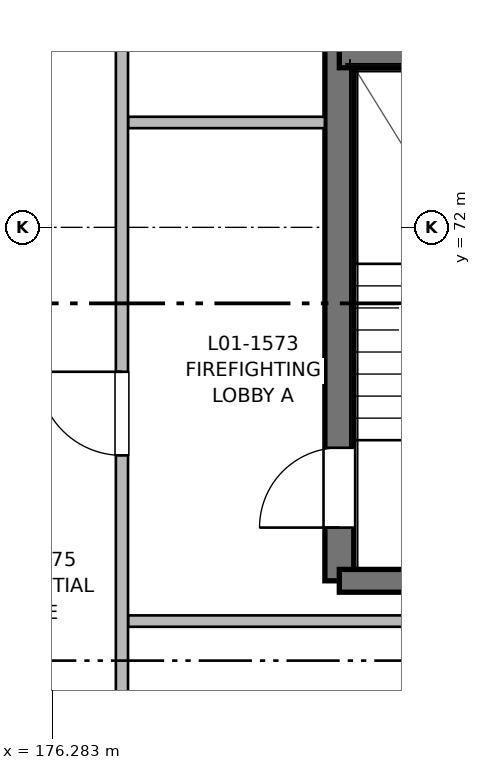
"""IFC4 building model, lengths in metres.
Left out: names, types, materials, properties, quantities, classifications, styles, units other than length and angle.
Written with IfcOpenShell. Run it as: python <this file> out.ifc"""

import sys

from ifc_helpers import new_model, si_unit, direction, frame, frame_2d, origin, place, context, subcontext, project, spatial, rectangle, extrude, element, fill, save


model = new_model("IFC4")
c1 = context("Model", 3, precision=1e-05, world=origin(), true_north=direction((0.0, 1.0)))
c2 = subcontext(c1, "Body", "Model", "MODEL_VIEW")
j1 = project(units=[si_unit("LENGTHUNIT", "METRE"), si_unit("PLANEANGLEUNIT", "RADIAN")], contexts=[c1])
p1 = place(None, origin())
s1 = spatial("IfcSite", under=j1, at=p1, CompositionType="ELEMENT")
p2 = place(p1, origin())
s2 = spatial("IfcBuilding", under=s1, at=p2, CompositionType="ELEMENT")
p3 = place(p2, frame((0.0, 0.0, 4.16)))
s3 = spatial("IfcBuildingStorey", under=s2, at=p3, CompositionType="ELEMENT", Elevation=4.16)
p4 = place(p3, frame((180.06, 67.35, 0.0), z_axis=(0.0, 0.0, 1.0), x_axis=(0.0, 1.0, 0.0)))
e1 = element("IfcWall", 1, at=p4, inside=s3, PredefinedType="SHEAR", context=c2, shape_type="SweptSolid", body=[
    extrude(rectangle(XDim=13.15, YDim=0.38, at=frame_2d((6.575, 0.0))), origin(), (0.0, 0.0, 1.0), 3.2),
])
p5 = place(p4, frame((0.7, 0.0, 0.0)))
e2 = element("IfcOpeningElement", 2, at=p5, cuts=e1, PredefinedType="OPENING", context=c2, shape_type="SweptSolid", body=[
    extrude(rectangle(XDim=1.05, YDim=2.15, at=frame_2d((0.525, 1.075))), frame((0.0, 0.2, 0.0), z_axis=(0.0, -1.0, 0.0), x_axis=(1.0, 0.0, 0.0)), (0.0, 0.0, 1.0), 0.4),
])
p6 = place(p3, frame((183.47, 67.35, 0.0), z_axis=(0.0, 0.0, 1.0), x_axis=(-1.0, 0.0, 0.0)))
e3 = element("IfcWall", 3, at=p6, inside=s3, PredefinedType="SHEAR", context=c2, shape_type="SweptSolid", body=[
    extrude(rectangle(XDim=3.41, YDim=0.3, at=frame_2d((1.705, 0.0))), origin(), (0.0, 0.0, 1.0), 3.2),
])
p7 = place(p3, frame((180.06, 74.24, 0.0), z_axis=(0.0, 0.0, 1.0), x_axis=(1.0, 0.0, 0.0)))
e4 = element("IfcWall", 4, at=p7, inside=s3, PredefinedType="SHEAR", context=c2, shape_type="SweptSolid", body=[
    extrude(rectangle(XDim=3.41, YDim=0.28, at=frame_2d((1.705, 0.0))), origin(), (0.0, 0.0, 1.0), 3.2),
])
p8 = place(p3, frame((177.28, 66.82, 0.0), z_axis=(0.0, 0.0, 1.0), x_axis=(1.0, 0.0, 0.0)))
e5 = element("IfcWall", 5, at=p8, inside=s3, PredefinedType="PARTITIONING", context=c2, shape_type="SweptSolid", body=[
    extrude(rectangle(XDim=6.59, YDim=0.15, at=frame_2d((3.295, 0.0))), origin(), (0.0, 0.0, 1.0), 2.935),
])
p9 = place(p3, frame((177.28, 73.38, 0.0), z_axis=(0.0, 0.0, 1.0), x_axis=(1.0, 0.0, 0.0)))
e6 = element("IfcWall", 6, at=p9, inside=s3, PredefinedType="PARTITIONING", context=c2, shape_type="SweptSolid", body=[
    extrude(rectangle(XDim=2.59, YDim=0.15, at=frame_2d((1.295, 0.0))), origin(), (0.0, 0.0, 1.0), 2.935),
])
p10 = place(p3, frame((177.2, 56.18, 0.0), z_axis=(0.0, 0.0, 1.0), x_axis=(0.0, 1.0, 0.0)))
e7 = element("IfcWall", 7, at=p10, inside=s3, PredefinedType="PARTITIONING", context=c2, shape_type="SweptSolid", body=[
    extrude(rectangle(XDim=50.62, YDim=0.16, at=frame_2d((25.31, 0.0))), origin(), (0.0, 0.0, 1.0), 2.935),
])
p11 = place(p10, frame((12.82, 0.0, 0.0)))
e8 = element("IfcOpeningElement", 8, at=p11, cuts=e7, PredefinedType="OPENING", context=c2, shape_type="SweptSolid", body=[
    extrude(rectangle(XDim=1.1, YDim=2.15, at=frame_2d((0.55, 1.075))), frame((0.0, 0.09, 0.0), z_axis=(0.0, -1.0, 0.0), x_axis=(1.0, 0.0, 0.0)), (0.0, 0.0, 1.0), 0.18),
])
p12 = place(p10, frame((19.22, 0.0, 0.0)))
e9 = element("IfcOpeningElement", 9, at=p12, cuts=e7, PredefinedType="OPENING", context=c2, shape_type="SweptSolid", body=[
    extrude(rectangle(XDim=1.6, YDim=2.15, at=frame_2d((0.8, 1.075))), frame((0.0, 0.09, 0.0), z_axis=(0.0, -1.0, 0.0), x_axis=(1.0, 0.0, 0.0)), (0.0, 0.0, 1.0), 0.18),
])
p13 = place(p10, frame((1.8, 0.0, 0.0)))
e10 = element("IfcOpeningElement", 10, at=p13, cuts=e7, PredefinedType="OPENING", context=c2, shape_type="SweptSolid", body=[
    extrude(rectangle(XDim=0.96, YDim=2.15, at=frame_2d((0.48, 1.075))), frame((0.0, 0.09, 0.0), z_axis=(0.0, -1.0, 0.0), x_axis=(1.0, 0.0, 0.0)), (0.0, 0.0, 1.0), 0.18),
])
p14 = place(p10, frame((32.85, 0.0, 0.0)))
e11 = element("IfcOpeningElement", 11, at=p14, cuts=e7, PredefinedType="OPENING", context=c2, shape_type="SweptSolid", body=[
    extrude(rectangle(XDim=0.98, YDim=2.15, at=frame_2d((0.49, 1.075))), frame((0.0, 0.09, 0.0), z_axis=(0.0, -1.0, 0.0), x_axis=(1.0, 0.0, 0.0)), (0.0, 0.0, 1.0), 0.18),
])
p15 = place(p10, frame((41.11, 0.0, 0.0)))
e12 = element("IfcOpeningElement", 12, at=p15, cuts=e7, PredefinedType="OPENING", context=c2, shape_type="SweptSolid", body=[
    extrude(rectangle(XDim=0.98, YDim=2.15, at=frame_2d((0.49, 1.075))), frame((0.0, 0.09, 0.0), z_axis=(0.0, -1.0, 0.0), x_axis=(1.0, 0.0, 0.0)), (0.0, 0.0, 1.0), 0.18),
])
p16 = place(p5, origin())
e13 = element("IfcDoor", 13, at=p16, inside=s3, OperationType="SINGLE_SWING_LEFT", PredefinedType="DOOR", context=c2, shape_type="SweptSolid", body=[
    extrude(rectangle(XDim=1.05, YDim=2.15, at=frame_2d((0.525, 1.075))), frame((0.0, 0.025, 0.0), z_axis=(0.0, -1.0, 0.0), x_axis=(1.0, 0.0, 0.0)), (0.0, 0.0, 1.0), 0.05),
])
fill(e2, e13)
p17 = place(p11, origin())
e14 = element("IfcDoor", 14, at=p17, inside=s3, OperationType="SINGLE_SWING_RIGHT", PredefinedType="DOOR", context=c2, shape_type="SweptSolid", body=[
    extrude(rectangle(XDim=1.1, YDim=2.15, at=frame_2d((0.55, 1.075))), frame((0.0, 0.025, 0.0), z_axis=(0.0, -1.0, 0.0), x_axis=(1.0, 0.0, 0.0)), (0.0, 0.0, 1.0), 0.05),
])
fill(e8, e14)
save(model, sys.argv[1])
